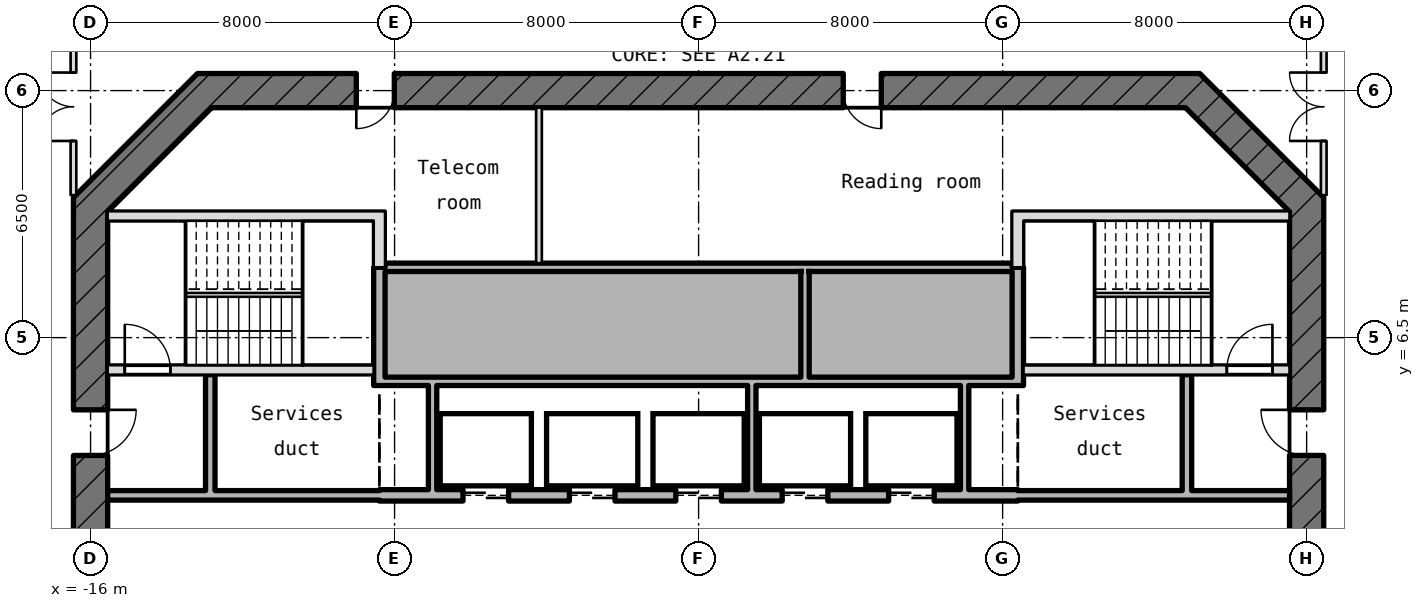
"""IFC4 building model, lengths in metres.
Left out: names, types, materials, properties, quantities, classifications, styles, units other than length and angle.
Written with IfcOpenShell. Run it as: python <this file> out.ifc"""

import sys

from ifc_helpers import new_model, si_unit, direction, frame, frame_2d, origin, place, context, subcontext, project, spatial, rectangle, extrude, element, fill, save


model = new_model("IFC4")
c1 = context("Model", 3, precision=1e-05, world=origin(), true_north=direction((0.0, 1.0)))
c2 = subcontext(c1, "Body", "Model", "MODEL_VIEW")
j1 = project(units=[si_unit("LENGTHUNIT", "METRE"), si_unit("PLANEANGLEUNIT", "RADIAN")], contexts=[c1])
p1 = place(None, origin())
s1 = spatial("IfcSite", under=j1, at=p1, CompositionType="ELEMENT")
p2 = place(p1, origin())
s2 = spatial("IfcBuilding", under=s1, at=p2, CompositionType="ELEMENT")
p3 = place(p2, frame((0.0, 0.0, 223.3)))
s3 = spatial("IfcBuildingStorey", under=s2, at=p3, CompositionType="ELEMENT", Elevation=223.3)
p4 = place(p3, frame((-15.249, 20.823, 0.0), z_axis=(0.0, 0.0, 1.0), x_axis=(-0.765870158107, -0.642995257308, 0.0)))
e1 = element("IfcWall", 1, at=p4, inside=s3, PredefinedType="SOLIDWALL", context=c2, shape_type="SweptSolid", body=[
    extrude(rectangle(XDim=11.055, YDim=0.3, at=frame_2d((5.528, 0.0))), origin(), (0.0, 0.0, 1.0), 3.97),
])
p5 = place(p4, frame((7.355, 0.0, 0.0)))
e2 = element("IfcOpeningElement", 2, at=p5, cuts=e1, PredefinedType="OPENING", context=c2, shape_type="SweptSolid", body=[
    extrude(rectangle(XDim=1.8, YDim=2.4, at=frame_2d((0.9, 1.2))), frame((0.0, 0.16, 0.0), z_axis=(0.0, -1.0, 0.0), x_axis=(1.0, 0.0, 0.0)), (0.0, 0.0, 1.0), 0.32),
])
p6 = place(p4, frame((4.755, 0.0, 0.9)))
e3 = element("IfcOpeningElement", 3, at=p6, cuts=e1, PredefinedType="OPENING", context=c2, shape_type="SweptSolid", body=[
    extrude(rectangle(XDim=2.0, YDim=1.5, at=frame_2d((1.0, 0.75))), frame((0.0, 0.16, 0.0), z_axis=(0.0, -1.0, 0.0), x_axis=(1.0, 0.0, 0.0)), (0.0, 0.0, 1.0), 0.32),
])
p7 = place(p3, frame((16.0, -10.186, -0.18), z_axis=(0.0, 0.0, 1.0), x_axis=(0.0, 1.0, 0.0)))
e4 = element("IfcWall", 4, at=p7, inside=s3, PredefinedType="SHEAR", context=c2, shape_type="SweptSolid", body=[
    extrude(rectangle(XDim=20.373, YDim=0.9, at=frame_2d((10.186, 0.0))), origin(), (0.0, 0.0, 1.0), 4.15),
])
p8 = place(p7, frame((8.986, 0.0, 0.18)))
e5 = element("IfcOpeningElement", 5, at=p8, cuts=e4, PredefinedType="OPENING", context=c2, shape_type="SweptSolid", body=[
    extrude(rectangle(XDim=2.4, YDim=2.1, at=frame_2d((1.2, 1.05))), frame((0.0, 0.46, 0.0), z_axis=(0.0, -1.0, 0.0), x_axis=(1.0, 0.0, 0.0)), (0.0, 0.0, 1.0), 0.92),
])
p9 = place(p7, frame((13.586, 0.0, 0.18)))
e6 = element("IfcOpeningElement", 6, at=p9, cuts=e4, PredefinedType="OPENING", context=c2, shape_type="SweptSolid", body=[
    extrude(rectangle(XDim=1.2, YDim=2.1, at=frame_2d((0.6, 1.05))), frame((0.0, 0.46, 0.0), z_axis=(0.0, -1.0, 0.0), x_axis=(1.0, 0.0, 0.0)), (0.0, 0.0, 1.0), 0.92),
])
p10 = place(p7, frame((2.4, 0.0, 0.18)))
e7 = element("IfcOpeningElement", 7, at=p10, cuts=e4, PredefinedType="OPENING", context=c2, shape_type="SweptSolid", body=[
    extrude(rectangle(XDim=1.2, YDim=2.1, at=frame_2d((0.6, 1.05))), frame((0.0, 0.46, 0.0), z_axis=(0.0, -1.0, 0.0), x_axis=(1.0, 0.0, 0.0)), (0.0, 0.0, 1.0), 0.92),
])
p11 = place(p3, frame((16.132, 9.868, -0.18), z_axis=(0.0, 0.0, 1.0), x_axis=(-0.707106781187, 0.707106781187, 0.0)))
e8 = element("IfcWall", 8, at=p11, inside=s3, PredefinedType="SHEAR", context=c2, shape_type="SweptSolid", body=[
    extrude(rectangle(XDim=4.615, YDim=0.9, at=frame_2d((2.308, 0.0))), origin(), (0.0, 0.0, 1.0), 4.15),
])
p12 = place(p3, frame((13.186, 13.0, -0.18), z_axis=(0.0, 0.0, 1.0), x_axis=(-1.0, 0.0, 0.0)))
e9 = element("IfcWall", 9, at=p12, inside=s3, PredefinedType="SHEAR", context=c2, shape_type="SweptSolid", body=[
    extrude(rectangle(XDim=26.373, YDim=0.9, at=frame_2d((13.186, 0.0))), origin(), (0.0, 0.0, 1.0), 4.15),
])
p13 = place(p12, frame((21.193, 0.0, 0.18)))
e10 = element("IfcOpeningElement", 10, at=p13, cuts=e9, PredefinedType="OPENING", context=c2, shape_type="SweptSolid", body=[
    extrude(rectangle(XDim=1.0, YDim=2.1, at=frame_2d((0.5, 1.05))), frame((0.0, 0.46, 0.0), z_axis=(0.0, -1.0, 0.0), x_axis=(1.0, 0.0, 0.0)), (0.0, 0.0, 1.0), 0.92),
])
p14 = place(p12, frame((8.379, 0.0, 0.18)))
e11 = element("IfcOpeningElement", 11, at=p14, cuts=e9, PredefinedType="OPENING", context=c2, shape_type="SweptSolid", body=[
    extrude(rectangle(XDim=1.0, YDim=2.1, at=frame_2d((0.5, 1.05))), frame((0.0, 0.46, 0.0), z_axis=(0.0, -1.0, 0.0), x_axis=(1.0, 0.0, 0.0)), (0.0, 0.0, 1.0), 0.92),
])
p15 = place(p3, frame((-12.868, 13.132, -0.18), z_axis=(0.0, 0.0, 1.0), x_axis=(-0.707106781187, -0.707106781187, 0.0)))
e12 = element("IfcWall", 12, at=p15, inside=s3, PredefinedType="SHEAR", context=c2, shape_type="SweptSolid", body=[
    extrude(rectangle(XDim=4.615, YDim=0.9, at=frame_2d((2.308, 0.0))), origin(), (0.0, 0.0, 1.0), 4.15),
])
p16 = place(p3, frame((-16.0, 10.186, -0.18), z_axis=(0.0, 0.0, 1.0), x_axis=(0.0, -1.0, 0.0)))
e13 = element("IfcWall", 13, at=p16, inside=s3, PredefinedType="SHEAR", context=c2, shape_type="SweptSolid", body=[
    extrude(rectangle(XDim=20.373, YDim=0.9, at=frame_2d((10.186, 0.0))), origin(), (0.0, 0.0, 1.0), 4.15),
])
p17 = place(p16, frame((8.986, 0.0, 0.18)))
e14 = element("IfcOpeningElement", 14, at=p17, cuts=e13, PredefinedType="OPENING", context=c2, shape_type="SweptSolid", body=[
    extrude(rectangle(XDim=2.4, YDim=2.1, at=frame_2d((1.2, 1.05))), frame((0.0, 0.46, 0.0), z_axis=(0.0, -1.0, 0.0), x_axis=(1.0, 0.0, 0.0)), (0.0, 0.0, 1.0), 0.92),
])
p18 = place(p16, frame((5.586, 0.0, 0.18)))
e15 = element("IfcOpeningElement", 15, at=p18, cuts=e13, PredefinedType="OPENING", context=c2, shape_type="SweptSolid", body=[
    extrude(rectangle(XDim=1.2, YDim=2.1, at=frame_2d((0.6, 1.05))), frame((0.0, 0.46, 0.0), z_axis=(0.0, -1.0, 0.0), x_axis=(1.0, 0.0, 0.0)), (0.0, 0.0, 1.0), 0.92),
])
p19 = place(p3, frame((-15.55, 2.35, 0.0), z_axis=(0.0, 0.0, 1.0), x_axis=(1.0, 0.0, 0.0)))
e16 = element("IfcWall", 16, at=p19, inside=s3, PredefinedType="STANDARD", context=c2, shape_type="SweptSolid", body=[
    extrude(rectangle(XDim=7.15, YDim=0.25, at=frame_2d((3.575, 0.0))), origin(), (0.0, 0.0, 1.0), 3.97),
])
p20 = place(p3, frame((-8.4, 2.35, -0.18), z_axis=(0.0, 0.0, 1.0), x_axis=(1.0, 0.0, 0.0)))
e17 = element("IfcWall", 17, at=p20, inside=s3, PredefinedType="SHEAR", context=c2, shape_type="SweptSolid", body=[
    extrude(rectangle(XDim=16.8, YDim=0.3, at=frame_2d((8.4, 0.0))), origin(), (0.0, 0.0, 1.0), 4.15),
])
p21 = place(p20, frame((2.2, 0.0, 0.18)))
e18 = element("IfcOpeningElement", 18, at=p21, cuts=e17, PredefinedType="OPENING", context=c2, shape_type="SweptSolid", body=[
    extrude(rectangle(XDim=1.2, YDim=2.1, at=frame_2d((0.6, 1.05))), frame((0.0, 0.16, 0.0), z_axis=(0.0, -1.0, 0.0), x_axis=(1.0, 0.0, 0.0)), (0.0, 0.0, 1.0), 0.32),
])
p22 = place(p20, frame((5.0, 0.0, 0.18)))
e19 = element("IfcOpeningElement", 19, at=p22, cuts=e17, PredefinedType="OPENING", context=c2, shape_type="SweptSolid", body=[
    extrude(rectangle(XDim=1.2, YDim=2.1, at=frame_2d((0.6, 1.05))), frame((0.0, 0.16, 0.0), z_axis=(0.0, -1.0, 0.0), x_axis=(1.0, 0.0, 0.0)), (0.0, 0.0, 1.0), 0.32),
])
p23 = place(p20, frame((7.8, 0.0, 0.18)))
e20 = element("IfcOpeningElement", 20, at=p23, cuts=e17, PredefinedType="OPENING", context=c2, shape_type="SweptSolid", body=[
    extrude(rectangle(XDim=1.2, YDim=2.1, at=frame_2d((0.6, 1.05))), frame((0.0, 0.16, 0.0), z_axis=(0.0, -1.0, 0.0), x_axis=(1.0, 0.0, 0.0)), (0.0, 0.0, 1.0), 0.32),
])
p24 = place(p20, frame((10.6, 0.0, 0.18)))
e21 = element("IfcOpeningElement", 21, at=p24, cuts=e17, PredefinedType="OPENING", context=c2, shape_type="SweptSolid", body=[
    extrude(rectangle(XDim=1.2, YDim=2.1, at=frame_2d((0.6, 1.05))), frame((0.0, 0.16, 0.0), z_axis=(0.0, -1.0, 0.0), x_axis=(1.0, 0.0, 0.0)), (0.0, 0.0, 1.0), 0.32),
])
p25 = place(p20, frame((13.4, 0.0, 0.18)))
e22 = element("IfcOpeningElement", 22, at=p25, cuts=e17, PredefinedType="OPENING", context=c2, shape_type="SweptSolid", body=[
    extrude(rectangle(XDim=1.2, YDim=2.1, at=frame_2d((0.6, 1.05))), frame((0.0, 0.16, 0.0), z_axis=(0.0, -1.0, 0.0), x_axis=(1.0, 0.0, 0.0)), (0.0, 0.0, 1.0), 0.32),
])
p26 = place(p3, frame((8.4, 2.35, 0.0), z_axis=(0.0, 0.0, 1.0), x_axis=(1.0, 0.0, 0.0)))
e23 = element("IfcWall", 23, at=p26, inside=s3, PredefinedType="STANDARD", context=c2, shape_type="SweptSolid", body=[
    extrude(rectangle(XDim=7.15, YDim=0.25, at=frame_2d((3.575, 0.0))), origin(), (0.0, 0.0, 1.0), 3.97),
])
p27 = place(p3, frame((-8.25, 5.35, 0.0), z_axis=(0.0, 0.0, 1.0), x_axis=(1.0, 0.0, 0.0)))
e24 = element("IfcWall", 24, at=p27, inside=s3, PredefinedType="STANDARD", context=c2, shape_type="SweptSolid", body=[
    extrude(rectangle(XDim=16.5, YDim=0.22, at=frame_2d((8.25, 0.0))), origin(), (0.0, 0.0, 1.0), 3.97),
])
p28 = place(p3, frame((-15.55, 5.65, -0.18), z_axis=(0.0, 0.0, 1.0), x_axis=(1.0, 0.0, 0.0)))
e25 = element("IfcWall", 25, at=p28, inside=s3, PredefinedType="SHEAR", context=c2, shape_type="SweptSolid", body=[
    extrude(rectangle(XDim=7.0, YDim=0.25, at=frame_2d((3.5, 0.0))), origin(), (0.0, 0.0, 1.0), 4.15),
])
p29 = place(p28, frame((0.45, 0.0, 0.18)))
e26 = element("IfcOpeningElement", 26, at=p29, cuts=e25, PredefinedType="OPENING", context=c2, shape_type="SweptSolid", body=[
    extrude(rectangle(XDim=1.2, YDim=2.1, at=frame_2d((0.6, 1.05))), frame((0.0, 0.135, 0.0), z_axis=(0.0, -1.0, 0.0), x_axis=(1.0, 0.0, 0.0)), (0.0, 0.0, 1.0), 0.27),
])
p30 = place(p3, frame((8.55, 5.65, -0.18), z_axis=(0.0, 0.0, 1.0), x_axis=(1.0, 0.0, 0.0)))
e27 = element("IfcWall", 27, at=p30, inside=s3, PredefinedType="SHEAR", context=c2, shape_type="SweptSolid", body=[
    extrude(rectangle(XDim=7.0, YDim=0.25, at=frame_2d((3.5, 0.0))), origin(), (0.0, 0.0, 1.0), 4.15),
])
p31 = place(p30, frame((5.35, 0.0, 0.18)))
e28 = element("IfcOpeningElement", 28, at=p31, cuts=e27, PredefinedType="OPENING", context=c2, shape_type="SweptSolid", body=[
    extrude(rectangle(XDim=1.2, YDim=2.1, at=frame_2d((0.6, 1.05))), frame((0.0, 0.135, 0.0), z_axis=(0.0, -1.0, 0.0), x_axis=(1.0, 0.0, 0.0)), (0.0, 0.0, 1.0), 0.27),
])
p32 = place(p3, frame((-8.25, 8.35, 0.0), z_axis=(0.0, 0.0, 1.0), x_axis=(1.0, 0.0, 0.0)))
e29 = element("IfcWall", 29, at=p32, inside=s3, PredefinedType="STANDARD", context=c2, shape_type="SweptSolid", body=[
    extrude(rectangle(XDim=16.5, YDim=0.22, at=frame_2d((8.25, 0.0))), origin(), (0.0, 0.0, 1.0), 3.97),
])
for number, where, z_axis, x_axis in (
    (30, (-15.55, 9.7, -0.18), (0.0, 0.0, 1.0), (1.0, 0.0, 0.0)),
    (31, (8.55, 9.7, -0.18), (0.0, 0.0, 1.0), (1.0, 0.0, 0.0)),
):
    element("IfcWall", number, at=place(p3, frame(where, z_axis=z_axis, x_axis=x_axis)), inside=s3, PredefinedType="SHEAR", context=c2, shape_type="SweptSolid", body=[
        extrude(rectangle(XDim=7.0, YDim=0.25, at=frame_2d((3.5, 0.0))), origin(), (0.0, 0.0, 1.0), 4.15),
    ])
p33 = place(p3, frame((-12.85, 2.475, 0.0), z_axis=(0.0, 0.0, 1.0), x_axis=(0.0, 1.0, 0.0)))
e32 = element("IfcWall", 32, at=p33, inside=s3, PredefinedType="STANDARD", context=c2, shape_type="SweptSolid", body=[
    extrude(rectangle(XDim=3.05, YDim=0.25, at=frame_2d((1.525, 0.0))), origin(), (0.0, 0.0, 1.0), 3.97),
])
p34 = place(p3, frame((-8.4, 5.24, -0.18), z_axis=(0.0, 0.0, 1.0), x_axis=(0.0, 1.0, 0.0)))
e33 = element("IfcWall", 33, at=p34, inside=s3, PredefinedType="SHEAR", context=c2, shape_type="SweptSolid", body=[
    extrude(rectangle(XDim=3.11, YDim=0.3, at=frame_2d((1.555, 0.0))), origin(), (0.0, 0.0, 1.0), 4.15),
])
p35 = place(p3, frame((-8.4, 8.35, -0.18), z_axis=(0.0, 0.0, 1.0), x_axis=(0.0, 1.0, 0.0)))
e34 = element("IfcWall", 34, at=p35, inside=s3, PredefinedType="SHEAR", context=c2, shape_type="SweptSolid", body=[
    extrude(rectangle(XDim=1.475, YDim=0.3, at=frame_2d((0.737, 0.0))), origin(), (0.0, 0.0, 1.0), 4.15),
])
p36 = place(p3, frame((-7.0, 2.5, 0.0), z_axis=(0.0, 0.0, 1.0), x_axis=(0.0, 1.0, 0.0)))
e35 = element("IfcWall", 35, at=p36, inside=s3, PredefinedType="STANDARD", context=c2, shape_type="SweptSolid", body=[
    extrude(rectangle(XDim=2.74, YDim=0.22, at=frame_2d((1.37, 0.0))), origin(), (0.0, 0.0, 1.0), 3.97),
])
p37 = place(p3, frame((-4.2, 8.46, 0.0), z_axis=(0.0, 0.0, 1.0), x_axis=(0.0, 1.0, 0.0)))
e36 = element("IfcWall", 36, at=p37, inside=s3, PredefinedType="PARTITIONING", context=c2, shape_type="SweptSolid", body=[
    extrude(rectangle(XDim=4.09, YDim=0.15, at=frame_2d((2.045, 0.0))), origin(), (0.0, 0.0, 1.0), 3.97),
])
p38 = place(p3, frame((1.4, 2.5, 0.0), z_axis=(0.0, 0.0, 1.0), x_axis=(0.0, 1.0, 0.0)))
e37 = element("IfcWall", 37, at=p38, inside=s3, PredefinedType="STANDARD", context=c2, shape_type="SweptSolid", body=[
    extrude(rectangle(XDim=2.74, YDim=0.22, at=frame_2d((1.37, 0.0))), origin(), (0.0, 0.0, 1.0), 3.97),
])
p39 = place(p3, frame((2.8, 5.46, 0.0), z_axis=(0.0, 0.0, 1.0), x_axis=(0.0, 1.0, 0.0)))
e38 = element("IfcWall", 38, at=p39, inside=s3, PredefinedType="STANDARD", context=c2, shape_type="SweptSolid", body=[
    extrude(rectangle(XDim=2.78, YDim=0.22, at=frame_2d((1.39, 0.0))), origin(), (0.0, 0.0, 1.0), 3.97),
])
p40 = place(p3, frame((7.0, 2.5, 0.0), z_axis=(0.0, 0.0, 1.0), x_axis=(0.0, 1.0, 0.0)))
e39 = element("IfcWall", 39, at=p40, inside=s3, PredefinedType="STANDARD", context=c2, shape_type="SweptSolid", body=[
    extrude(rectangle(XDim=2.74, YDim=0.22, at=frame_2d((1.37, 0.0))), origin(), (0.0, 0.0, 1.0), 3.97),
])
p41 = place(p3, frame((8.4, 5.24, -0.18), z_axis=(0.0, 0.0, 1.0), x_axis=(0.0, 1.0, 0.0)))
e40 = element("IfcWall", 40, at=p41, inside=s3, PredefinedType="SHEAR", context=c2, shape_type="SweptSolid", body=[
    extrude(rectangle(XDim=3.11, YDim=0.3, at=frame_2d((1.555, 0.0))), origin(), (0.0, 0.0, 1.0), 4.15),
])
p42 = place(p3, frame((8.4, 8.35, -0.18), z_axis=(0.0, 0.0, 1.0), x_axis=(0.0, 1.0, 0.0)))
e41 = element("IfcWall", 41, at=p42, inside=s3, PredefinedType="SHEAR", context=c2, shape_type="SweptSolid", body=[
    extrude(rectangle(XDim=1.475, YDim=0.3, at=frame_2d((0.737, 0.0))), origin(), (0.0, 0.0, 1.0), 4.15),
])
p43 = place(p3, frame((12.85, 2.475, 0.0), z_axis=(0.0, 0.0, 1.0), x_axis=(0.0, 1.0, 0.0)))
e42 = element("IfcWall", 42, at=p43, inside=s3, PredefinedType="STANDARD", context=c2, shape_type="SweptSolid", body=[
    extrude(rectangle(XDim=3.05, YDim=0.25, at=frame_2d((1.525, 0.0))), origin(), (0.0, 0.0, 1.0), 3.97),
])
p44 = place(p3, frame((-16.45, 10.25, 0.0), z_axis=(0.0, 0.0, 1.0), x_axis=(0.0, 1.0, 0.0)))
e43 = element("IfcWall", 43, at=p44, inside=s3, PredefinedType="PARTITIONING", context=c2, shape_type="SweptSolid", body=[
    extrude(rectangle(XDim=7.011, YDim=0.15, at=frame_2d((3.505, 0.0))), origin(), (0.0, 0.0, 1.0), 3.97),
])
p45 = place(p44, frame((1.425, 0.0, 0.0)))
e44 = element("IfcOpeningElement", 44, at=p45, cuts=e43, PredefinedType="OPENING", context=c2, shape_type="SweptSolid", body=[
    extrude(rectangle(XDim=1.8, YDim=2.1, at=frame_2d((0.9, 1.05))), frame((0.0, 0.085, 0.0), z_axis=(0.0, -1.0, 0.0), x_axis=(1.0, 0.0, 0.0)), (0.0, 0.0, 1.0), 0.17),
])
p46 = place(p3, frame((16.45, 10.25, 0.0), z_axis=(0.0, 0.0, 1.0), x_axis=(0.0, 1.0, 0.0)))
e45 = element("IfcWall", 45, at=p46, inside=s3, PredefinedType="PARTITIONING", context=c2, shape_type="SweptSolid", body=[
    extrude(rectangle(XDim=7.011, YDim=0.15, at=frame_2d((3.505, 0.0))), origin(), (0.0, 0.0, 1.0), 3.97),
])
p47 = place(p46, frame((1.425, 0.0, 0.0)))
e46 = element("IfcOpeningElement", 46, at=p47, cuts=e45, PredefinedType="OPENING", context=c2, shape_type="SweptSolid", body=[
    extrude(rectangle(XDim=1.8, YDim=2.1, at=frame_2d((0.9, 1.05))), frame((0.0, 0.085, 0.0), z_axis=(0.0, -1.0, 0.0), x_axis=(1.0, 0.0, 0.0)), (0.0, 0.0, 1.0), 0.17),
])
p48 = place(p21, origin())
e47 = element("IfcDoor", 47, at=p48, inside=s3, OperationType="DOUBLE_DOOR_SLIDING", PredefinedType="DOOR", context=c2, shape_type="SweptSolid", body=[
    extrude(rectangle(XDim=1.2, YDim=2.1, at=frame_2d((0.6, 1.05))), frame((0.0, 0.025, 0.0), z_axis=(0.0, -1.0, 0.0), x_axis=(1.0, 0.0, 0.0)), (0.0, 0.0, 1.0), 0.05),
])
fill(e18, e47)
p49 = place(p22, origin())
e48 = element("IfcDoor", 48, at=p49, inside=s3, OperationType="DOUBLE_DOOR_SLIDING", PredefinedType="DOOR", context=c2, shape_type="SweptSolid", body=[
    extrude(rectangle(XDim=1.2, YDim=2.1, at=frame_2d((0.6, 1.05))), frame((0.0, 0.025, 0.0), z_axis=(0.0, -1.0, 0.0), x_axis=(1.0, 0.0, 0.0)), (0.0, 0.0, 1.0), 0.05),
])
fill(e19, e48)
p50 = place(p23, origin())
e49 = element("IfcDoor", 49, at=p50, inside=s3, OperationType="DOUBLE_DOOR_SLIDING", PredefinedType="DOOR", context=c2, shape_type="SweptSolid", body=[
    extrude(rectangle(XDim=1.2, YDim=2.1, at=frame_2d((0.6, 1.05))), frame((0.0, 0.025, 0.0), z_axis=(0.0, -1.0, 0.0), x_axis=(1.0, 0.0, 0.0)), (0.0, 0.0, 1.0), 0.05),
])
fill(e20, e49)
p51 = place(p24, origin())
e50 = element("IfcDoor", 50, at=p51, inside=s3, OperationType="DOUBLE_DOOR_SLIDING", PredefinedType="DOOR", context=c2, shape_type="SweptSolid", body=[
    extrude(rectangle(XDim=1.2, YDim=2.1, at=frame_2d((0.6, 1.05))), frame((0.0, 0.025, 0.0), z_axis=(0.0, -1.0, 0.0), x_axis=(1.0, 0.0, 0.0)), (0.0, 0.0, 1.0), 0.05),
])
fill(e21, e50)
p52 = place(p25, origin())
e51 = element("IfcDoor", 51, at=p52, inside=s3, OperationType="DOUBLE_DOOR_SLIDING", PredefinedType="DOOR", context=c2, shape_type="SweptSolid", body=[
    extrude(rectangle(XDim=1.2, YDim=2.1, at=frame_2d((0.6, 1.05))), frame((0.0, 0.025, 0.0), z_axis=(0.0, -1.0, 0.0), x_axis=(1.0, 0.0, 0.0)), (0.0, 0.0, 1.0), 0.05),
])
fill(e22, e51)
p53 = place(p29, origin())
e52 = element("IfcDoor", 52, at=p53, inside=s3, OperationType="SINGLE_SWING_RIGHT", PredefinedType="DOOR", context=c2, shape_type="SweptSolid", body=[
    extrude(rectangle(XDim=1.2, YDim=2.1, at=frame_2d((0.6, 1.05))), frame((0.0, 0.025, 0.0), z_axis=(0.0, -1.0, 0.0), x_axis=(1.0, 0.0, 0.0)), (0.0, 0.0, 1.0), 0.05),
])
fill(e26, e52)
p54 = place(p31, origin())
e53 = element("IfcDoor", 53, at=p54, inside=s3, OperationType="SINGLE_SWING_RIGHT", PredefinedType="DOOR", context=c2, shape_type="SweptSolid", body=[
    extrude(rectangle(XDim=1.2, YDim=2.1, at=frame_2d((0.6, 1.05))), frame((0.0, 0.025, 0.0), z_axis=(0.0, -1.0, 0.0), x_axis=(1.0, 0.0, 0.0)), (0.0, 0.0, 1.0), 0.05),
])
fill(e28, e53)
p55 = place(p18, origin())
e54 = element("IfcDoor", 54, at=p55, inside=s3, OperationType="SINGLE_SWING_RIGHT", PredefinedType="DOOR", context=c2, shape_type="SweptSolid", body=[
    extrude(rectangle(XDim=1.2, YDim=2.1, at=frame_2d((0.6, 1.05))), frame((0.0, 0.025, 0.0), z_axis=(0.0, -1.0, 0.0), x_axis=(1.0, 0.0, 0.0)), (0.0, 0.0, 1.0), 0.05),
])
fill(e15, e54)
p56 = place(p9, origin())
e55 = element("IfcDoor", 55, at=p56, inside=s3, OperationType="SINGLE_SWING_RIGHT", PredefinedType="DOOR", context=c2, shape_type="SweptSolid", body=[
    extrude(rectangle(XDim=1.2, YDim=2.1, at=frame_2d((0.6, 1.05))), frame((0.0, 0.025, 0.0), z_axis=(0.0, -1.0, 0.0), x_axis=(1.0, 0.0, 0.0)), (0.0, 0.0, 1.0), 0.05),
])
fill(e6, e55)
p57 = place(p13, origin())
e56 = element("IfcDoor", 56, at=p57, inside=s3, OperationType="SINGLE_SWING_RIGHT", PredefinedType="DOOR", context=c2, shape_type="SweptSolid", body=[
    extrude(rectangle(XDim=1.0, YDim=2.1, at=frame_2d((0.5, 1.05))), frame((0.0, 0.025, 0.0), z_axis=(0.0, -1.0, 0.0), x_axis=(1.0, 0.0, 0.0)), (0.0, 0.0, 1.0), 0.05),
])
fill(e10, e56)
p58 = place(p14, origin())
e57 = element("IfcDoor", 57, at=p58, inside=s3, OperationType="SINGLE_SWING_RIGHT", PredefinedType="DOOR", context=c2, shape_type="SweptSolid", body=[
    extrude(rectangle(XDim=1.0, YDim=2.1, at=frame_2d((0.5, 1.05))), frame((0.0, 0.025, 0.0), z_axis=(0.0, -1.0, 0.0), x_axis=(1.0, 0.0, 0.0)), (0.0, 0.0, 1.0), 0.05),
])
fill(e11, e57)
p59 = place(p45, origin())
e58 = element("IfcDoor", 58, at=p59, inside=s3, OperationType="DOUBLE_DOOR_SINGLE_SWING", PredefinedType="DOOR", context=c2, shape_type="SweptSolid", body=[
    extrude(rectangle(XDim=1.8, YDim=2.1, at=frame_2d((0.9, 1.05))), frame((0.0, 0.025, 0.0), z_axis=(0.0, -1.0, 0.0), x_axis=(1.0, 0.0, 0.0)), (0.0, 0.0, 1.0), 0.05),
])
fill(e44, e58)
p60 = place(p47, origin())
e59 = element("IfcDoor", 59, at=p60, inside=s3, OperationType="DOUBLE_DOOR_SINGLE_SWING", PredefinedType="DOOR", context=c2, shape_type="SweptSolid", body=[
    extrude(rectangle(XDim=1.8, YDim=2.1, at=frame_2d((0.9, 1.05))), frame((0.0, 0.025, 0.0), z_axis=(0.0, -1.0, 0.0), x_axis=(1.0, 0.0, 0.0)), (0.0, 0.0, 1.0), 0.05),
])
fill(e46, e59)
save(model, sys.argv[1])
